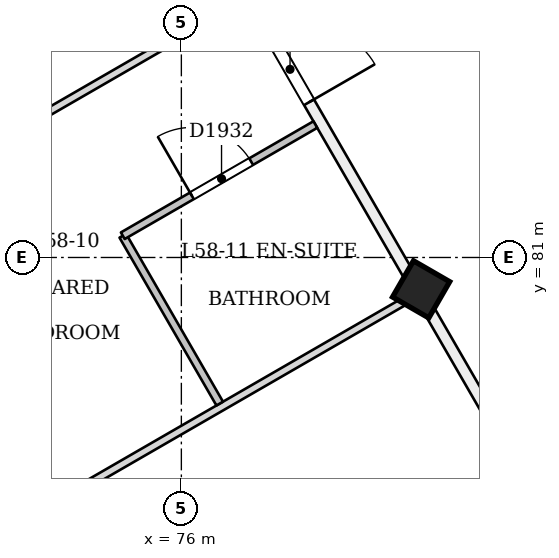
"""IFC4 building model, lengths in metres.
Left out: names, types, materials, properties, quantities, classifications, styles, units other than length and angle.
Written with IfcOpenShell. Run it as: python <this file> out.ifc"""

import sys

from ifc_helpers import new_model, si_unit, direction, frame, frame_2d, origin, origin_2d, place, context, subcontext, project, spatial, rectangle, extrude, element, fill, save


model = new_model("IFC4")
c1 = context("Model", 3, precision=1e-05, world=origin(), true_north=direction((0.0, 1.0)))
c2 = subcontext(c1, "Body", "Model", "MODEL_VIEW")
j1 = project(units=[si_unit("LENGTHUNIT", "METRE"), si_unit("PLANEANGLEUNIT", "RADIAN")], contexts=[c1])
p1 = place(None, origin())
s1 = spatial("IfcSite", under=j1, at=p1, CompositionType="ELEMENT")
p2 = place(p1, origin())
s2 = spatial("IfcBuilding", under=s1, at=p2, CompositionType="ELEMENT")
p3 = place(p2, frame((0.0, 0.0, 226.6)))
s3 = spatial("IfcBuildingStorey", under=s2, at=p3, CompositionType="ELEMENT", Elevation=226.6)
p4 = place(p3, frame((79.127, 80.534, -0.017), z_axis=(0.022221406801, 0.038413224561, 0.999014831351), x_axis=(-0.8660213715, -0.498527787681, 0.038432135187)))
e1 = element("IfcColumn", 1, at=p4, inside=s3, PredefinedType="COLUMN", context=c2, shape_type="SweptSolid", body=[
    extrude(rectangle(XDim=0.55, YDim=0.55, at=origin_2d()), origin(), (0.0, 0.0, 1.0), 3.604),
])
p5 = place(p3, frame((73.888, 77.509, -0.023), z_axis=(0.022153634206, 0.038480930364, 0.999013730882), x_axis=(-0.864979728815, -0.500331280926, 0.038453583269)))
e2 = element("IfcColumn", 2, at=p5, inside=s3, PredefinedType="COLUMN", context=c2, shape_type="SweptSolid", body=[
    extrude(rectangle(XDim=0.75, YDim=0.75, at=origin_2d()), origin(), (0.0, 0.0, 1.0), 3.604),
])
p6 = place(p3, frame((81.532, 82.572, 0.0), z_axis=(0.0, 0.0, 1.0), x_axis=(-0.481054749011, 0.87669055456, 0.0)))
e3 = element("IfcWall", 3, at=p6, inside=s3, PredefinedType="PARTITIONING", context=c2, shape_type="SweptSolid", body=[
    extrude(rectangle(XDim=9.157, YDim=0.15, at=frame_2d((4.579, 0.0))), origin(), (0.0, 0.0, 1.0), 3.2),
])
p7 = place(p6, frame((4.549, 0.0, 0.0)))
e4 = element("IfcOpeningElement", 4, at=p7, cuts=e3, PredefinedType="OPENING", context=c2, shape_type="SweptSolid", body=[
    extrude(rectangle(XDim=1.0, YDim=2.1, at=frame_2d((0.5, 1.05))), frame((0.0, 0.085, 0.0), z_axis=(0.0, -1.0, 0.0), x_axis=(1.0, 0.0, 0.0)), (0.0, 0.0, 1.0), 0.171),
])
p8 = place(p3, frame((73.547, 90.2, 0.0), z_axis=(0.0, 0.0, 1.0), x_axis=(0.5000057019, -0.866022111766, 0.0)))
e5 = element("IfcWall", 5, at=p8, inside=s3, PredefinedType="PARTITIONING", context=c2, shape_type="SweptSolid", body=[
    extrude(rectangle(XDim=22.906, YDim=0.15, at=frame_2d((11.453, 0.0))), origin(), (0.0, 0.0, 1.0), 2.8),
])
p9 = place(p8, frame((0.248, 0.0, 0.0)))
e6 = element("IfcOpeningElement", 6, at=p9, cuts=e5, PredefinedType="OPENING", context=c2, shape_type="SweptSolid", body=[
    extrude(rectangle(XDim=1.0, YDim=2.1, at=frame_2d((0.5, 1.05))), frame((0.0, 0.085, 0.0), z_axis=(0.0, -1.0, 0.0), x_axis=(1.0, 0.0, 0.0)), (0.0, 0.0, 1.0), 0.171),
])
p10 = place(p8, frame((3.911, 0.0, 0.0)))
e7 = element("IfcOpeningElement", 7, at=p10, cuts=e5, PredefinedType="OPENING", context=c2, shape_type="SweptSolid", body=[
    extrude(rectangle(XDim=1.0, YDim=2.1, at=frame_2d((0.5, 1.05))), frame((0.0, 0.085, 0.0), z_axis=(0.0, -1.0, 0.0), x_axis=(1.0, 0.0, 0.0)), (0.0, 0.0, 1.0), 0.171),
])
p11 = place(p8, frame((7.265, 0.0, 0.0)))
e8 = element("IfcOpeningElement", 8, at=p11, cuts=e5, PredefinedType="OPENING", context=c2, shape_type="SweptSolid", body=[
    extrude(rectangle(XDim=1.0, YDim=2.1, at=frame_2d((0.5, 1.05))), frame((0.0, 0.085, 0.0), z_axis=(0.0, -1.0, 0.0), x_axis=(1.0, 0.0, 0.0)), (0.0, 0.0, 1.0), 0.171),
])
p12 = place(p8, frame((15.061, 0.0, 0.0)))
e9 = element("IfcOpeningElement", 9, at=p12, cuts=e5, PredefinedType="OPENING", context=c2, shape_type="SweptSolid", body=[
    extrude(rectangle(XDim=1.2, YDim=2.1, at=frame_2d((0.6, 1.05))), frame((0.0, 0.085, 0.0), z_axis=(0.0, -1.0, 0.0), x_axis=(1.0, 0.0, 0.0)), (0.0, 0.0, 1.0), 0.171),
])
p13 = place(p8, frame((21.066, 0.0, 0.0)))
e10 = element("IfcOpeningElement", 10, at=p13, cuts=e5, PredefinedType="OPENING", context=c2, shape_type="SweptSolid", body=[
    extrude(rectangle(XDim=1.2, YDim=2.1, at=frame_2d((0.6, 1.05))), frame((0.0, 0.085, 0.0), z_axis=(0.0, -1.0, 0.0), x_axis=(1.0, 0.0, 0.0)), (0.0, 0.0, 1.0), 0.171),
])
p14 = place(p3, frame((71.318, 81.221, 0.0), z_axis=(0.0, 0.0, 1.0), x_axis=(0.866025401434, 0.500000004071, 0.0)))
e11 = element("IfcWall", 11, at=p14, inside=s3, PredefinedType="PARTITIONING", context=c2, shape_type="SweptSolid", body=[
    extrude(rectangle(XDim=6.345, YDim=0.1, at=frame_2d((3.173, 0.0))), origin(), (0.0, 0.0, 1.0), 2.7),
])
p15 = place(p3, frame((76.505, 79.078, 0.0), z_axis=(0.0, 0.0, 1.0), x_axis=(-0.500062241894, 0.865989465428, 0.0)))
e12 = element("IfcWall", 12, at=p15, inside=s3, PredefinedType="PARTITIONING", context=c2, shape_type="SweptSolid", body=[
    extrude(rectangle(XDim=2.55, YDim=0.1, at=frame_2d((1.275, 0.0))), origin(), (0.0, 0.0, 1.0), 2.8),
])
p16 = place(p3, frame((75.229, 81.286, 0.0), z_axis=(0.0, 0.0, 1.0), x_axis=(0.86601045545, 0.500025890382, 0.0)))
e13 = element("IfcWall", 13, at=p16, inside=s3, PredefinedType="PARTITIONING", context=c2, shape_type="SweptSolid", body=[
    extrude(rectangle(XDim=2.925, YDim=0.1, at=frame_2d((1.462, 0.0))), origin(), (0.0, 0.0, 1.0), 3.2),
])
p17 = place(p16, frame((1.05, 0.0, 0.0)))
e14 = element("IfcOpeningElement", 14, at=p17, cuts=e13, PredefinedType="OPENING", context=c2, shape_type="SweptSolid", body=[
    extrude(rectangle(XDim=0.9, YDim=2.1, at=frame_2d((0.45, 1.05))), frame((0.0, 0.061, 0.0), z_axis=(0.0, -1.0, 0.0), x_axis=(1.0, 0.0, 0.0)), (0.0, 0.0, 1.0), 0.121),
])
p18 = place(p3, frame((73.585, 77.334, 0.0), z_axis=(0.0, 0.0, 1.0), x_axis=(0.866025537322, 0.499999768706, 0.0)))
e15 = element("IfcWall", 15, at=p18, inside=s3, PredefinedType="PARTITIONING", context=c2, shape_type="SweptSolid", body=[
    extrude(rectangle(XDim=6.325, YDim=0.1, at=frame_2d((3.163, 0.0))), origin(), (0.0, 0.0, 1.0), 2.7),
])
p19 = place(p11, origin())
e16 = element("IfcDoor", 16, at=p19, inside=s3, OperationType="SINGLE_SWING_RIGHT", PredefinedType="NOTDEFINED", context=c2, shape_type="SweptSolid", body=[
    extrude(rectangle(XDim=1.0, YDim=2.1, at=frame_2d((0.5, 1.05))), frame((0.0, 0.025, 0.0), z_axis=(0.0, -1.0, 0.0), x_axis=(1.0, 0.0, 0.0)), (0.0, 0.0, 1.0), 0.05),
])
fill(e8, e16)
p20 = place(p17, origin())
e17 = element("IfcDoor", 17, at=p20, inside=s3, OperationType="SINGLE_SWING_LEFT", PredefinedType="NOTDEFINED", context=c2, shape_type="SweptSolid", body=[
    extrude(rectangle(XDim=0.9, YDim=2.1, at=frame_2d((0.45, 1.05))), frame((0.0, 0.025, 0.0), z_axis=(0.0, -1.0, 0.0), x_axis=(1.0, 0.0, 0.0)), (0.0, 0.0, 1.0), 0.05),
])
fill(e14, e17)
save(model, sys.argv[1])
